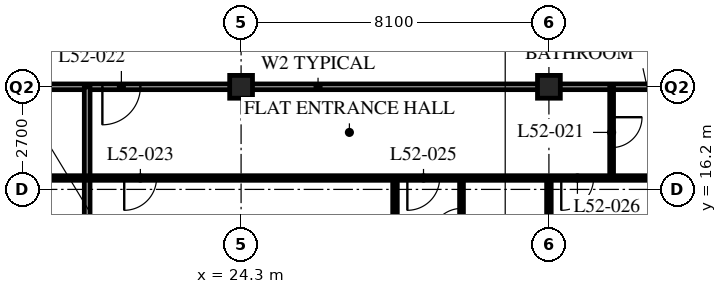
"""IFC4 building model, lengths in metres.
Left out: names, types, materials, properties, quantities, classifications, styles, units other than length and angle.
Written with IfcOpenShell. Run it as: python <this file> out.ifc"""

import sys

from ifc_helpers import new_model, si_unit, direction, frame, frame_2d, origin, origin_2d, place, context, subcontext, project, spatial, rectangle, hollow_rectangle, extrude, element, fill, save


model = new_model("IFC4")
c1 = context("Model", 3, precision=1e-05, world=origin(), true_north=direction((0.0, 1.0)))
c2 = subcontext(c1, "Body", "Model", "MODEL_VIEW")
j1 = project(units=[si_unit("LENGTHUNIT", "METRE"), si_unit("PLANEANGLEUNIT", "RADIAN")], contexts=[c1])
p1 = place(None, origin())
s1 = spatial("IfcSite", under=j1, at=p1, CompositionType="ELEMENT")
p2 = place(p1, origin())
s2 = spatial("IfcBuilding", under=s1, at=p2, CompositionType="ELEMENT")
p3 = place(p2, frame((0.0, 0.0, 202.8)))
s3 = spatial("IfcBuildingStorey", under=s2, at=p3, CompositionType="ELEMENT", Elevation=202.8)
for number, where, z_axis, x_axis in (
    (1, (24.3, 18.9, 0.0), (0.0, 0.0, 1.0), (1.0, 0.0, 0.0)),
    (2, (32.4, 18.9, 0.0), (0.0, 0.0, 1.0), (1.0, 0.0, 0.0)),
):
    element("IfcColumn", number, at=place(p3, frame(where, z_axis=z_axis, x_axis=x_axis)), inside=s3, PredefinedType="COLUMN", context=c2, shape_type="SweptSolid", body=[
        extrude(hollow_rectangle(XDim=0.6, YDim=0.6, WallThickness=0.05, at=origin_2d()), origin(), (0.0, 0.0, 1.0), 3.6),
    ])
p4 = place(p3, frame((8.1, 18.9, 0.0), z_axis=(0.0, 0.0, 1.0), x_axis=(1.0, 0.0, 0.0)))
e3 = element("IfcWall", 3, at=p4, inside=s3, PredefinedType="PARTITIONING", context=c2, shape_type="SweptSolid", body=[
    extrude(rectangle(XDim=36.45, YDim=0.15, at=frame_2d((18.225, 0.0))), origin(), (0.0, 0.0, 1.0), 2.778),
])
p5 = place(p4, frame((4.45, 0.0, 0.0)))
e4 = element("IfcOpeningElement", 4, at=p5, cuts=e3, PredefinedType="OPENING", context=c2, shape_type="SweptSolid", body=[
    extrude(rectangle(XDim=1.0, YDim=2.1, at=frame_2d((0.5, 1.05))), frame((0.0, 0.085, 0.0), z_axis=(0.0, -1.0, 0.0), x_axis=(1.0, 0.0, 0.0)), (0.0, 0.0, 1.0), 0.17),
])
p6 = place(p4, frame((12.55, 0.0, 0.0)))
e5 = element("IfcOpeningElement", 5, at=p6, cuts=e3, PredefinedType="OPENING", context=c2, shape_type="SweptSolid", body=[
    extrude(rectangle(XDim=1.0, YDim=2.1, at=frame_2d((0.5, 1.05))), frame((0.0, 0.085, 0.0), z_axis=(0.0, -1.0, 0.0), x_axis=(1.0, 0.0, 0.0)), (0.0, 0.0, 1.0), 0.17),
])
p7 = place(p4, frame((29.05, 0.0, 0.0)))
e6 = element("IfcOpeningElement", 6, at=p7, cuts=e3, PredefinedType="OPENING", context=c2, shape_type="SweptSolid", body=[
    extrude(rectangle(XDim=1.0, YDim=2.1, at=frame_2d((0.5, 1.05))), frame((0.0, 0.085, 0.0), z_axis=(0.0, -1.0, 0.0), x_axis=(1.0, 0.0, 0.0)), (0.0, 0.0, 1.0), 0.17),
])
p8 = place(p4, frame((2.625, 0.0, 0.0)))
e7 = element("IfcOpeningElement", 7, at=p8, cuts=e3, PredefinedType="OPENING", context=c2, shape_type="SweptSolid", body=[
    extrude(rectangle(XDim=1.0, YDim=2.1, at=frame_2d((0.5, 1.05))), frame((0.0, 0.085, 0.0), z_axis=(0.0, -1.0, 0.0), x_axis=(1.0, 0.0, 0.0)), (0.0, 0.0, 1.0), 0.17),
])
p9 = place(p4, frame((33.925, 0.0, 0.0)))
e8 = element("IfcOpeningElement", 8, at=p9, cuts=e3, PredefinedType="OPENING", context=c2, shape_type="SweptSolid", body=[
    extrude(rectangle(XDim=1.0, YDim=2.1, at=frame_2d((0.5, 1.05))), frame((0.0, 0.085, 0.0), z_axis=(0.0, -1.0, 0.0), x_axis=(1.0, 0.0, 0.0)), (0.0, 0.0, 1.0), 0.17),
])
p10 = place(p3, frame((20.25, 18.9, 0.0), z_axis=(0.0, 0.0, 1.0), x_axis=(0.0, -1.0, 0.0)))
e9 = element("IfcWall", 9, at=p10, inside=s3, PredefinedType="PARTITIONING", context=c2, shape_type="SweptSolid", body=[
    extrude(rectangle(XDim=7.8, YDim=0.15, at=frame_2d((3.9, 0.0))), origin(), (0.0, 0.0, 1.0), 3.39),
])
p11 = place(p3, frame((34.05, 18.9, 0.0), z_axis=(0.0, 0.0, 1.0), x_axis=(0.0, -1.0, 0.0)))
e10 = element("IfcWall", 10, at=p11, inside=s3, PredefinedType="PARTITIONING", context=c2, shape_type="SweptSolid", body=[
    extrude(rectangle(XDim=2.4, YDim=0.1, at=frame_2d((1.2, 0.0))), origin(), (0.0, 0.0, 1.0), 3.39),
])
p12 = place(p11, frame((0.8, 0.0, 0.0)))
e11 = element("IfcOpeningElement", 11, at=p12, cuts=e10, PredefinedType="OPENING", context=c2, shape_type="SweptSolid", body=[
    extrude(rectangle(XDim=0.8, YDim=2.1, at=frame_2d((0.4, 1.05))), frame((0.0, 0.06, 0.0), z_axis=(0.0, -1.0, 0.0), x_axis=(1.0, 0.0, 0.0)), (0.0, 0.0, 1.0), 0.12),
])
p13 = place(p3, frame((30.1, 16.5, 0.0), z_axis=(0.0, 0.0, 1.0), x_axis=(0.0, -1.0, 0.0)))
e12 = element("IfcWall", 12, at=p13, inside=s3, PredefinedType="PARTITIONING", context=c2, shape_type="SweptSolid", body=[
    extrude(rectangle(XDim=2.4, YDim=0.1, at=frame_2d((1.2, 0.0))), origin(), (0.0, 0.0, 1.0), 3.39),
])
p14 = place(p13, frame((0.8, 0.0, 0.0)))
e13 = element("IfcOpeningElement", 13, at=p14, cuts=e12, PredefinedType="OPENING", context=c2, shape_type="SweptSolid", body=[
    extrude(rectangle(XDim=0.8, YDim=2.1, at=frame_2d((0.4, 1.05))), frame((0.0, 0.06, 0.0), z_axis=(0.0, -1.0, 0.0), x_axis=(1.0, 0.0, 0.0)), (0.0, 0.0, 1.0), 0.12),
])
p15 = place(p3, frame((28.35, 16.5, 0.0), z_axis=(0.0, 0.0, 1.0), x_axis=(0.0, -1.0, 0.0)))
e14 = element("IfcWall", 14, at=p15, inside=s3, PredefinedType="PARTITIONING", context=c2, shape_type="SweptSolid", body=[
    extrude(rectangle(XDim=5.4, YDim=0.12, at=frame_2d((2.7, 0.0))), origin(), (0.0, 0.0, 1.0), 3.39),
])
p16 = place(p3, frame((32.4, 16.5, 0.0), z_axis=(0.0, 0.0, 1.0), x_axis=(0.0, -1.0, 0.0)))
e15 = element("IfcWall", 15, at=p16, inside=s3, PredefinedType="PARTITIONING", context=c2, shape_type="SweptSolid", body=[
    extrude(rectangle(XDim=5.4, YDim=0.12, at=frame_2d((2.7, 0.0))), origin(), (0.0, 0.0, 1.0), 2.778),
])
p17 = place(p3, frame((8.1, 16.5, 0.0), z_axis=(0.0, 0.0, 1.0), x_axis=(1.0, 0.0, 0.0)))
e16 = element("IfcWall", 16, at=p17, inside=s3, PredefinedType="PARTITIONING", context=c2, shape_type="SweptSolid", body=[
    extrude(rectangle(XDim=28.35, YDim=0.12, at=frame_2d((14.175, 0.0))), origin(), (0.0, 0.0, 1.0), 3.39),
])
p18 = place(p17, frame((5.025, 0.0, 0.0)))
e17 = element("IfcOpeningElement", 17, at=p18, cuts=e16, PredefinedType="OPENING", context=c2, shape_type="SweptSolid", body=[
    extrude(rectangle(XDim=0.85, YDim=2.1, at=frame_2d((0.425, 1.05))), frame((0.0, 0.07, 0.0), z_axis=(0.0, -1.0, 0.0), x_axis=(1.0, 0.0, 0.0)), (0.0, 0.0, 1.0), 0.14),
])
p19 = place(p17, frame((8.425, 0.0, 0.0)))
e18 = element("IfcOpeningElement", 18, at=p19, cuts=e16, PredefinedType="OPENING", context=c2, shape_type="SweptSolid", body=[
    extrude(rectangle(XDim=0.85, YDim=2.1, at=frame_2d((0.425, 1.05))), frame((0.0, 0.07, 0.0), z_axis=(0.0, -1.0, 0.0), x_axis=(1.0, 0.0, 0.0)), (0.0, 0.0, 1.0), 0.14),
])
p20 = place(p17, frame((13.125, 0.0, 0.0)))
e19 = element("IfcOpeningElement", 19, at=p20, cuts=e16, PredefinedType="OPENING", context=c2, shape_type="SweptSolid", body=[
    extrude(rectangle(XDim=0.85, YDim=2.1, at=frame_2d((0.425, 1.05))), frame((0.0, 0.07, 0.0), z_axis=(0.0, -1.0, 0.0), x_axis=(1.0, 0.0, 0.0)), (0.0, 0.0, 1.0), 0.14),
])
p21 = place(p17, frame((20.575, 0.0, 0.0)))
e20 = element("IfcOpeningElement", 20, at=p21, cuts=e16, PredefinedType="OPENING", context=c2, shape_type="SweptSolid", body=[
    extrude(rectangle(XDim=0.85, YDim=2.1, at=frame_2d((0.425, 1.05))), frame((0.0, 0.07, 0.0), z_axis=(0.0, -1.0, 0.0), x_axis=(1.0, 0.0, 0.0)), (0.0, 0.0, 1.0), 0.14),
])
p22 = place(p17, frame((24.625, 0.0, 0.0)))
e21 = element("IfcOpeningElement", 21, at=p22, cuts=e16, PredefinedType="OPENING", context=c2, shape_type="SweptSolid", body=[
    extrude(rectangle(XDim=0.85, YDim=2.1, at=frame_2d((0.425, 1.05))), frame((0.0, 0.07, 0.0), z_axis=(0.0, -1.0, 0.0), x_axis=(1.0, 0.0, 0.0)), (0.0, 0.0, 1.0), 0.14),
])
p23 = place(p17, frame((2.725, 0.0, 0.0)))
e22 = element("IfcOpeningElement", 22, at=p23, cuts=e16, PredefinedType="OPENING", context=c2, shape_type="SweptSolid", body=[
    extrude(rectangle(XDim=0.85, YDim=2.1, at=frame_2d((0.425, 1.05))), frame((0.0, 0.07, 0.0), z_axis=(0.0, -1.0, 0.0), x_axis=(1.0, 0.0, 0.0)), (0.0, 0.0, 1.0), 0.14),
])
p24 = place(p12, origin())
e23 = element("IfcDoor", 23, at=p24, inside=s3, OperationType="SINGLE_SWING_LEFT", PredefinedType="DOOR", context=c2, shape_type="SweptSolid", body=[
    extrude(rectangle(XDim=0.8, YDim=2.1, at=frame_2d((0.4, 1.05))), frame((0.0, 0.025, 0.0), z_axis=(0.0, -1.0, 0.0), x_axis=(1.0, 0.0, 0.0)), (0.0, 0.0, 1.0), 0.05),
])
fill(e11, e23)
p25 = place(p6, origin())
e24 = element("IfcDoor", 24, at=p25, inside=s3, OperationType="SINGLE_SWING_RIGHT", PredefinedType="DOOR", context=c2, shape_type="SweptSolid", body=[
    extrude(rectangle(XDim=1.0, YDim=2.1, at=frame_2d((0.5, 1.05))), frame((0.0, 0.025, 0.0), z_axis=(0.0, -1.0, 0.0), x_axis=(1.0, 0.0, 0.0)), (0.0, 0.0, 1.0), 0.05),
])
fill(e5, e24)
p26 = place(p20, origin())
e25 = element("IfcDoor", 25, at=p26, inside=s3, OperationType="SINGLE_SWING_RIGHT", PredefinedType="DOOR", context=c2, shape_type="SweptSolid", body=[
    extrude(rectangle(XDim=0.85, YDim=2.1, at=frame_2d((0.425, 1.05))), frame((0.0, 0.025, 0.0), z_axis=(0.0, -1.0, 0.0), x_axis=(1.0, 0.0, 0.0)), (0.0, 0.0, 1.0), 0.05),
])
fill(e19, e25)
p27 = place(p14, origin())
e26 = element("IfcDoor", 26, at=p27, inside=s3, OperationType="SINGLE_SWING_LEFT", PredefinedType="DOOR", context=c2, shape_type="SweptSolid", body=[
    extrude(rectangle(XDim=0.8, YDim=2.1, at=frame_2d((0.4, 1.05))), frame((0.0, 0.025, 0.0), z_axis=(0.0, -1.0, 0.0), x_axis=(1.0, 0.0, 0.0)), (0.0, 0.0, 1.0), 0.05),
])
fill(e13, e26)
p28 = place(p21, origin())
e27 = element("IfcDoor", 27, at=p28, inside=s3, OperationType="SINGLE_SWING_RIGHT", PredefinedType="DOOR", context=c2, shape_type="SweptSolid", body=[
    extrude(rectangle(XDim=0.85, YDim=2.1, at=frame_2d((0.425, 1.05))), frame((0.0, 0.025, 0.0), z_axis=(0.0, -1.0, 0.0), x_axis=(1.0, 0.0, 0.0)), (0.0, 0.0, 1.0), 0.05),
])
fill(e20, e27)
p29 = place(p22, origin())
e28 = element("IfcDoor", 28, at=p29, inside=s3, OperationType="SINGLE_SWING_RIGHT", PredefinedType="DOOR", context=c2, shape_type="SweptSolid", body=[
    extrude(rectangle(XDim=0.85, YDim=2.1, at=frame_2d((0.425, 1.05))), frame((0.0, 0.025, 0.0), z_axis=(0.0, -1.0, 0.0), x_axis=(1.0, 0.0, 0.0)), (0.0, 0.0, 1.0), 0.05),
])
fill(e21, e28)
save(model, sys.argv[1])
